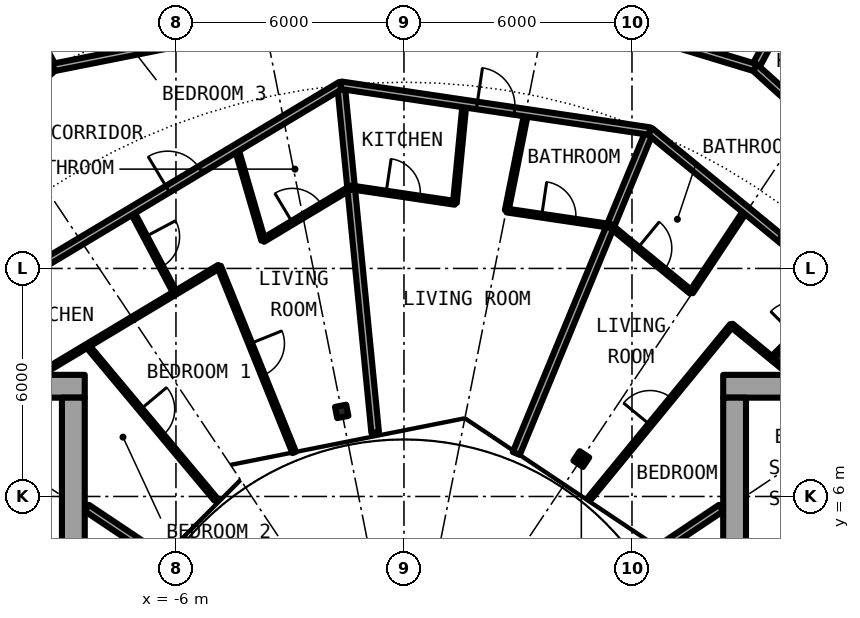
"""IFC4 building model, lengths in metres.
Left out: names, types, materials, properties, quantities, classifications, styles, units other than length and angle.
Written with IfcOpenShell. Run it as: python <this file> out.ifc"""

import sys

from ifc_helpers import new_model, si_unit, direction, frame, frame_2d, origin, origin_2d, place, context, subcontext, project, spatial, rectangle, i_section, extrude, element, fill, save


model = new_model("IFC4")
c1 = context("Model", 3, precision=1e-05, world=origin(), true_north=direction((0.0, 1.0)))
c2 = subcontext(c1, "Body", "Model", "MODEL_VIEW")
j1 = project(units=[si_unit("LENGTHUNIT", "METRE"), si_unit("PLANEANGLEUNIT", "RADIAN")], contexts=[c1])
p1 = place(None, origin())
s1 = spatial("IfcSite", under=j1, at=p1, CompositionType="ELEMENT")
p2 = place(p1, origin())
s2 = spatial("IfcBuilding", under=s1, at=p2, CompositionType="ELEMENT")
p3 = place(p2, frame((0.0, 0.0, 129.95)))
s3 = spatial("IfcBuildingStorey", under=s2, at=p3, CompositionType="ELEMENT", Elevation=129.95)
for number, where, z_axis, x_axis in (
    (1, (4.667, 6.984, 0.0), (0.0, 0.0, 1.0), (0.556, 0.831, 0.0)),
    (2, (-1.639, 8.239, 0.0), (0.0, 0.0, 1.0), (-0.195, 0.981, 0.0)),
):
    element("IfcColumn", number, at=place(p3, frame(where, z_axis=z_axis, x_axis=x_axis)), inside=s3, PredefinedType="COLUMN", context=c2, shape_type="SweptSolid", body=[
        extrude(i_section(OverallWidth=0.3, OverallDepth=0.3, WebThickness=0.011, FlangeThickness=0.019, FilletRadius=0.027, at=origin_2d()), origin(), (0.0, 0.0, 1.0), 3.05),
    ])
p4 = place(p3, frame((22.2, 8.9, 0.0), z_axis=(0.0, 0.0, 1.0), x_axis=(-1.0, 0.0, 0.0)))
e3 = element("IfcWall", 3, at=p4, inside=s3, PredefinedType="SHEAR", context=c2, shape_type="SweptSolid", body=[
    extrude(rectangle(XDim=13.8, YDim=0.6, at=frame_2d((6.9, 0.0))), origin(), (0.0, 0.0, 1.0), 3.05),
])
p5 = place(p4, frame((1.125, 0.0, 0.0)))
e4 = element("IfcOpeningElement", 4, at=p5, cuts=e3, PredefinedType="OPENING", context=c2, shape_type="SweptSolid", body=[
    extrude(rectangle(XDim=1.2, YDim=2.3, at=frame_2d((0.6, 1.15))), frame((0.0, 0.31, 0.0), z_axis=(0.0, -1.0, 0.0), x_axis=(1.0, 0.0, 0.0)), (0.0, 0.0, 1.0), 0.62),
])
p6 = place(p3, frame((8.7, -8.6, 0.0), z_axis=(0.0, 0.0, 1.0), x_axis=(0.0, 1.0, 0.0)))
e5 = element("IfcWall", 5, at=p6, inside=s3, PredefinedType="SHEAR", context=c2, shape_type="SweptSolid", body=[
    extrude(rectangle(XDim=17.2, YDim=0.6, at=frame_2d((8.6, 0.0))), origin(), (0.0, 0.0, 1.0), 3.05),
])
p7 = place(p6, frame((7.4, 0.0, 0.1)))
e6 = element("IfcOpeningElement", 6, at=p7, cuts=e5, PredefinedType="OPENING", context=c2, shape_type="SweptSolid", body=[
    extrude(rectangle(XDim=2.4, YDim=2.2, at=frame_2d((1.2, 1.1))), frame((0.0, 0.31, 0.0), z_axis=(0.0, -1.0, 0.0), x_axis=(1.0, 0.0, 0.0)), (0.0, 0.0, 1.0), 0.62),
])
p8 = place(p3, frame((-8.4, 8.9, 0.0), z_axis=(0.0, 0.0, 1.0), x_axis=(-1.0, 0.0, 0.0)))
e7 = element("IfcWall", 7, at=p8, inside=s3, PredefinedType="SHEAR", context=c2, shape_type="SweptSolid", body=[
    extrude(rectangle(XDim=13.8, YDim=0.6, at=frame_2d((6.9, 0.0))), origin(), (0.0, 0.0, 1.0), 3.05),
])
p9 = place(p8, frame((11.475, 0.0, 0.0)))
e8 = element("IfcOpeningElement", 8, at=p9, cuts=e7, PredefinedType="OPENING", context=c2, shape_type="SweptSolid", body=[
    extrude(rectangle(XDim=1.2, YDim=2.3, at=frame_2d((0.6, 1.15))), frame((0.0, 0.31, 0.0), z_axis=(0.0, -1.0, 0.0), x_axis=(1.0, 0.0, 0.0)), (0.0, 0.0, 1.0), 0.62),
])
p10 = place(p3, frame((-8.7, 8.6, 0.0), z_axis=(0.0, 0.0, 1.0), x_axis=(0.0, -1.0, 0.0)))
e9 = element("IfcWall", 9, at=p10, inside=s3, PredefinedType="SHEAR", context=c2, shape_type="SweptSolid", body=[
    extrude(rectangle(XDim=17.2, YDim=0.6, at=frame_2d((8.6, 0.0))), origin(), (0.0, 0.0, 1.0), 3.05),
])
p11 = place(p10, frame((7.4, 0.0, 0.1)))
e10 = element("IfcOpeningElement", 10, at=p11, cuts=e9, PredefinedType="OPENING", context=c2, shape_type="SweptSolid", body=[
    extrude(rectangle(XDim=2.4, YDim=2.2, at=frame_2d((1.2, 1.1))), frame((0.0, 0.31, 0.0), z_axis=(0.0, -1.0, 0.0), x_axis=(1.0, 0.0, 0.0)), (0.0, 0.0, 1.0), 0.62),
])
p12 = place(p3, frame((-12.815, 23.963, 0.0), z_axis=(0.0, 0.0, 1.0), x_axis=(0.471506520577, -0.881862574925, 0.0)))
e11 = element("IfcWall", 11, at=p12, inside=s3, PredefinedType="PARTITIONING", context=c2, shape_type="SweptSolid", body=[
    extrude(rectangle(XDim=7.574, YDim=0.2, at=frame_2d((3.787, 0.0))), origin(), (0.0, 0.0, 1.0), 2.7),
])
p13 = place(p3, frame((-8.335, 9.97, 0.0), z_axis=(0.0, 0.0, 1.0), x_axis=(0.641376424834, -0.767226356213, 0.0)))
e12 = element("IfcWall", 12, at=p13, inside=s3, PredefinedType="PARTITIONING", context=c2, shape_type="SweptSolid", body=[
    extrude(rectangle(XDim=5.275, YDim=0.1, at=frame_2d((2.637, 0.0))), origin(), (0.0, 0.0, 1.0), 2.7),
])
p14 = place(p13, frame((2.187, 0.0, 0.0)))
e13 = element("IfcOpeningElement", 13, at=p14, cuts=e12, PredefinedType="OPENING", context=c2, shape_type="SweptSolid", body=[
    extrude(rectangle(XDim=0.9, YDim=2.3, at=frame_2d((0.45, 1.15))), frame((0.0, 0.06, 0.0), z_axis=(0.0, -1.0, 0.0), x_axis=(1.0, 0.0, 0.0)), (0.0, 0.0, 1.0), 0.12),
])
p15 = place(p3, frame((-7.166, 13.517, 0.0), z_axis=(0.0, 0.0, 1.0), x_axis=(0.468337293896, -0.883549760425, 0.0)))
e14 = element("IfcWall", 14, at=p15, inside=s3, PredefinedType="PARTITIONING", context=c2, shape_type="SweptSolid", body=[
    extrude(rectangle(XDim=2.445, YDim=0.1, at=frame_2d((1.222, 0.0))), origin(), (0.0, 0.0, 1.0), 2.7),
])
p16 = place(p15, frame((0.772, 0.0, 0.0)))
e15 = element("IfcOpeningElement", 15, at=p16, cuts=e14, PredefinedType="OPENING", context=c2, shape_type="SweptSolid", body=[
    extrude(rectangle(XDim=0.9, YDim=2.3, at=frame_2d((0.45, 1.15))), frame((0.0, 0.06, 0.0), z_axis=(0.0, -1.0, 0.0), x_axis=(1.0, 0.0, 0.0)), (0.0, 0.0, 1.0), 0.12),
])
p17 = place(p3, frame((-4.864, 12.051, 0.0), z_axis=(0.0, 0.0, 1.0), x_axis=(0.374372761824, -0.927278294367, 0.0)))
e16 = element("IfcWall", 16, at=p17, inside=s3, PredefinedType="PARTITIONING", context=c2, shape_type="SweptSolid", body=[
    extrude(rectangle(XDim=5.276, YDim=0.1, at=frame_2d((2.638, 0.0))), origin(), (0.0, 0.0, 1.0), 2.7),
])
p18 = place(p17, frame((2.188, 0.0, 0.0)))
e17 = element("IfcOpeningElement", 17, at=p18, cuts=e16, PredefinedType="OPENING", context=c2, shape_type="SweptSolid", body=[
    extrude(rectangle(XDim=0.9, YDim=2.3, at=frame_2d((0.45, 1.15))), frame((0.0, 0.06, 0.0), z_axis=(0.0, -1.0, 0.0), x_axis=(1.0, 0.0, 0.0)), (0.0, 0.0, 1.0), 0.12),
])
p19 = place(p3, frame((-4.411, 15.168, 0.0), z_axis=(0.0, 0.0, 1.0), x_axis=(0.279201466266, -0.960232545395, 0.0)))
e18 = element("IfcWall", 18, at=p19, inside=s3, PredefinedType="PARTITIONING", context=c2, shape_type="SweptSolid", body=[
    extrude(rectangle(XDim=2.524, YDim=0.1, at=frame_2d((1.262, 0.0))), origin(), (0.0, 0.0, 1.0), 2.7),
])
p20 = place(p3, frame((-1.656, 16.819, 0.0), z_axis=(0.0, 0.0, 1.0), x_axis=(0.097815726767, -0.995204543597, 0.0)))
e19 = element("IfcWall", 19, at=p20, inside=s3, PredefinedType="PARTITIONING", context=c2, shape_type="SweptSolid", body=[
    extrude(rectangle(XDim=9.18, YDim=0.2, at=frame_2d((4.59, 0.0))), origin(), (0.0, 0.0, 1.0), 2.7),
])
p21 = place(p3, frame((1.339, 13.727, 0.0), z_axis=(0.0, 0.0, 1.0), x_axis=(0.096830025237, 0.995300932489, 0.0)))
e20 = element("IfcWall", 20, at=p21, inside=s3, PredefinedType="PARTITIONING", context=c2, shape_type="SweptSolid", body=[
    extrude(rectangle(XDim=2.622, YDim=0.1, at=frame_2d((1.311, 0.0))), origin(), (0.0, 0.0, 1.0), 2.7),
])
p22 = place(p3, frame((2.704, 13.524, 0.0), z_axis=(0.0, 0.0, 1.0), x_axis=(0.195937128464, 0.980616460034, 0.0)))
e21 = element("IfcWall", 21, at=p22, inside=s3, PredefinedType="PARTITIONING", context=c2, shape_type="SweptSolid", body=[
    extrude(rectangle(XDim=2.623, YDim=0.1, at=frame_2d((1.312, 0.0))), origin(), (0.0, 0.0, 1.0), 2.7),
])
p23 = place(p3, frame((2.955, 7.132, 0.0), z_axis=(0.0, 0.0, 1.0), x_axis=(0.382556139466, 0.923932248683, 0.0)))
e22 = element("IfcWall", 22, at=p23, inside=s3, PredefinedType="PARTITIONING", context=c2, shape_type="SweptSolid", body=[
    extrude(rectangle(XDim=9.18, YDim=0.2, at=frame_2d((4.59, 0.0))), origin(), (0.0, 0.0, 1.0), 2.7),
])
p24 = place(p3, frame((4.899, 5.967, 0.0), z_axis=(0.0, 0.0, 1.0), x_axis=(0.634358693064, 0.773038840249, 0.0)))
e23 = element("IfcWall", 23, at=p24, inside=s3, PredefinedType="PARTITIONING", context=c2, shape_type="SweptSolid", body=[
    extrude(rectangle(XDim=5.868, YDim=0.1, at=frame_2d((2.934, 0.0))), origin(), (0.0, 0.0, 1.0), 2.7),
])
p25 = place(p24, frame((2.484, 0.0, 0.0)))
e24 = element("IfcOpeningElement", 24, at=p25, cuts=e23, PredefinedType="OPENING", context=c2, shape_type="SweptSolid", body=[
    extrude(rectangle(XDim=0.9, YDim=2.3, at=frame_2d((0.45, 1.15))), frame((0.0, 0.06, 0.0), z_axis=(0.0, -1.0, 0.0), x_axis=(1.0, 0.0, 0.0)), (0.0, 0.0, 1.0), 0.12),
])
p26 = place(p3, frame((7.56, 11.375, 0.0), z_axis=(0.0, 0.0, 1.0), x_axis=(0.553354377247, 0.83294593653, 0.0)))
e25 = element("IfcWall", 25, at=p26, inside=s3, PredefinedType="PARTITIONING", context=c2, shape_type="SweptSolid", body=[
    extrude(rectangle(XDim=2.597, YDim=0.1, at=frame_2d((1.298, 0.0))), origin(), (0.0, 0.0, 1.0), 2.7),
])
p27 = place(p3, frame((9.239, 17.286, 0.0), z_axis=(0.0, 0.0, 1.0), x_axis=(0.471439510802, 0.881898399848, 0.0)))
e26 = element("IfcWall", 26, at=p27, inside=s3, PredefinedType="PARTITIONING", context=c2, shape_type="SweptSolid", body=[
    extrude(rectangle(XDim=7.575, YDim=0.2, at=frame_2d((3.787, 0.0))), origin(), (0.0, 0.0, 1.0), 2.7),
])
p28 = place(p3, frame((9.683, 9.632, 0.0), z_axis=(0.0, 0.0, 1.0), x_axis=(0.708796844581, 0.705412668665, 0.0)))
e27 = element("IfcWall", 27, at=p28, inside=s3, PredefinedType="PARTITIONING", context=c2, shape_type="SweptSolid", body=[
    extrude(rectangle(XDim=2.597, YDim=0.1, at=frame_2d((1.299, 0.0))), origin(), (0.0, 0.0, 1.0), 2.7),
])
p29 = place(p28, frame((0.849, 0.0, 0.0)))
e28 = element("IfcOpeningElement", 28, at=p29, cuts=e27, PredefinedType="OPENING", context=c2, shape_type="SweptSolid", body=[
    extrude(rectangle(XDim=0.9, YDim=2.3, at=frame_2d((0.45, 1.15))), frame((0.0, 0.06, 0.0), z_axis=(0.0, -1.0, 0.0), x_axis=(1.0, 0.0, 0.0)), (0.0, 0.0, 1.0), 0.12),
])
for number, where, z_axis, x_axis in (
    (29, (-6.513, 4.472, 0.0), (0.0, 0.0, 1.0), (-0.831, 0.556, 0.0)),
    (30, (6.513, 4.472, 0.0), (0.0, 0.0, 1.0), (0.831, 0.556, 0.0)),
):
    element("IfcWall", number, at=place(p3, frame(where, z_axis=z_axis, x_axis=x_axis)), inside=s3, PredefinedType="PARTITIONING", context=c2, shape_type="SweptSolid", body=[
        extrude(rectangle(XDim=2.203, YDim=0.2, at=frame_2d((1.101, 0.0))), origin(), (0.0, 0.0, 1.0), 2.7),
    ])
p30 = place(p3, frame((-9.623, 9.195, 0.0), z_axis=(0.0, 0.0, 1.0), x_axis=(0.857574416464, 0.514359913122, 0.0)))
e31 = element("IfcWall", 31, at=p30, inside=s3, PredefinedType="PARTITIONING", context=c2, shape_type="SweptSolid", body=[
    extrude(rectangle(XDim=5.551, YDim=0.1, at=frame_2d((2.775, 0.0))), origin(), (0.0, 0.0, 1.0), 2.7),
])
p31 = place(p3, frame((-3.706, 12.744, 0.0), z_axis=(0.0, 0.0, 1.0), x_axis=(0.857524856518, 0.514442533674, 0.0)))
e32 = element("IfcWall", 32, at=p31, inside=s3, PredefinedType="PARTITIONING", context=c2, shape_type="SweptSolid", body=[
    extrude(rectangle(XDim=2.698, YDim=0.1, at=frame_2d((1.349, 0.0))), origin(), (0.0, 0.0, 1.0), 2.7),
])
p32 = place(p31, frame((0.899, 0.0, 0.0)))
e33 = element("IfcOpeningElement", 33, at=p32, cuts=e32, PredefinedType="OPENING", context=c2, shape_type="SweptSolid", body=[
    extrude(rectangle(XDim=0.9, YDim=2.3, at=frame_2d((0.45, 1.15))), frame((0.0, 0.06, 0.0), z_axis=(0.0, -1.0, 0.0), x_axis=(1.0, 0.0, 0.0)), (0.0, 0.0, 1.0), 0.12),
])
p33 = place(p3, frame((5.431, 13.12, 0.0), z_axis=(0.0, 0.0, 1.0), x_axis=(0.773149312811, -0.634224045665, 0.0)))
e34 = element("IfcWall", 34, at=p33, inside=s3, PredefinedType="PARTITIONING", context=c2, shape_type="SweptSolid", body=[
    extrude(rectangle(XDim=2.749, YDim=0.1, at=frame_2d((1.374, 0.0))), origin(), (0.0, 0.0, 1.0), 2.7),
])
p34 = place(p33, frame((0.927, 0.0, 0.0)))
e35 = element("IfcOpeningElement", 35, at=p34, cuts=e34, PredefinedType="OPENING", context=c2, shape_type="SweptSolid", body=[
    extrude(rectangle(XDim=0.9, YDim=2.3, at=frame_2d((0.45, 1.15))), frame((0.0, 0.06, 0.0), z_axis=(0.0, -1.0, 0.0), x_axis=(1.0, 0.0, 0.0)), (0.0, 0.0, 1.0), 0.12),
])
p35 = place(p3, frame((8.618, 10.506, 0.0), z_axis=(0.0, 0.0, 1.0), x_axis=(0.772998703631, -0.634407600983, 0.0)))
e36 = element("IfcWall", 36, at=p35, inside=s3, PredefinedType="PARTITIONING", context=c2, shape_type="SweptSolid", body=[
    extrude(rectangle(XDim=2.056, YDim=0.1, at=frame_2d((1.028, 0.0))), origin(), (0.0, 0.0, 1.0), 2.7),
])
p36 = place(p3, frame((-1.392, 14.132, 0.0), z_axis=(0.0, 0.0, 1.0), x_axis=(0.989153611195, -0.146884762516, 0.0)))
e37 = element("IfcWall", 37, at=p36, inside=s3, PredefinedType="PARTITIONING", context=c2, shape_type="SweptSolid", body=[
    extrude(rectangle(XDim=2.764, YDim=0.1, at=frame_2d((1.382, 0.0))), origin(), (0.0, 0.0, 1.0), 2.7),
])
p37 = place(p36, frame((0.932, 0.0, 0.0)))
e38 = element("IfcOpeningElement", 38, at=p37, cuts=e37, PredefinedType="OPENING", context=c2, shape_type="SweptSolid", body=[
    extrude(rectangle(XDim=0.9, YDim=2.3, at=frame_2d((0.45, 1.15))), frame((0.0, 0.06, 0.0), z_axis=(0.0, -1.0, 0.0), x_axis=(1.0, 0.0, 0.0)), (0.0, 0.0, 1.0), 0.12),
])
p38 = place(p3, frame((2.707, 13.523, 0.0), z_axis=(0.0, 0.0, 1.0), x_axis=(0.98916494308, -0.146808430897, 0.0)))
e39 = element("IfcWall", 39, at=p38, inside=s3, PredefinedType="PARTITIONING", context=c2, shape_type="SweptSolid", body=[
    extrude(rectangle(XDim=2.759, YDim=0.1, at=frame_2d((1.379, 0.0))), origin(), (0.0, 0.0, 1.0), 2.7),
])
p39 = place(p38, frame((0.927, 0.0, 0.0)))
e40 = element("IfcOpeningElement", 40, at=p39, cuts=e39, PredefinedType="OPENING", context=c2, shape_type="SweptSolid", body=[
    extrude(rectangle(XDim=0.9, YDim=2.3, at=frame_2d((0.45, 1.15))), frame((0.0, 0.06, 0.0), z_axis=(0.0, -1.0, 0.0), x_axis=(1.0, 0.0, 0.0)), (0.0, 0.0, 1.0), 0.12),
])
p40 = place(p3, frame((-12.675, 10.215, 0.0), z_axis=(0.0, 0.0, 1.0), x_axis=(0.85772761283, 0.514104407867, 0.0)))
e41 = element("IfcWall", 41, at=p40, inside=s3, PredefinedType="PARTITIONING", context=c2, shape_type="SweptSolid", body=[
    extrude(rectangle(XDim=12.846, YDim=0.2, at=frame_2d((6.423, 0.0))), origin(), (0.0, 0.0, 1.0), 2.7),
])
p41 = place(p40, frame((7.529, 0.0, 0.0)))
e42 = element("IfcOpeningElement", 42, at=p41, cuts=e41, PredefinedType="OPENING", context=c2, shape_type="SweptSolid", body=[
    extrude(rectangle(XDim=1.0, YDim=2.3, at=frame_2d((0.5, 1.15))), frame((0.0, 0.11, 0.0), z_axis=(0.0, -1.0, 0.0), x_axis=(1.0, 0.0, 0.0)), (0.0, 0.0, 1.0), 0.22),
])
p42 = place(p3, frame((6.47, 15.613, 0.0), z_axis=(0.0, 0.0, 1.0), x_axis=(0.77292501819, -0.634497372931, 0.0)))
e43 = element("IfcWall", 43, at=p42, inside=s3, PredefinedType="PARTITIONING", context=c2, shape_type="SweptSolid", body=[
    extrude(rectangle(XDim=9.81, YDim=0.2, at=frame_2d((4.905, 0.0))), origin(), (0.0, 0.0, 1.0), 2.7),
])
p43 = place(p42, frame((4.404, 0.0, 0.0)))
e44 = element("IfcOpeningElement", 44, at=p43, cuts=e43, PredefinedType="OPENING", context=c2, shape_type="SweptSolid", body=[
    extrude(rectangle(XDim=1.0, YDim=2.3, at=frame_2d((0.5, 1.15))), frame((0.0, 0.11, 0.0), z_axis=(0.0, -1.0, 0.0), x_axis=(1.0, 0.0, 0.0)), (0.0, 0.0, 1.0), 0.22),
])
p44 = place(p3, frame((-1.656, 16.819, 0.0), z_axis=(0.0, 0.0, 1.0), x_axis=(0.989174071716, -0.146746910856, 0.0)))
e45 = element("IfcWall", 45, at=p44, inside=s3, PredefinedType="PARTITIONING", context=c2, shape_type="SweptSolid", body=[
    extrude(rectangle(XDim=8.212, YDim=0.2, at=frame_2d((4.106, 0.0))), origin(), (0.0, 0.0, 1.0), 2.7),
])
p45 = place(p44, frame((3.614, 0.0, 0.0)))
e46 = element("IfcOpeningElement", 46, at=p45, cuts=e45, PredefinedType="OPENING", context=c2, shape_type="SweptSolid", body=[
    extrude(rectangle(XDim=1.0, YDim=2.3, at=frame_2d((0.5, 1.15))), frame((0.0, 0.11, 0.0), z_axis=(0.0, -1.0, 0.0), x_axis=(1.0, 0.0, 0.0)), (0.0, 0.0, 1.0), 0.22),
])
p46 = place(p3, frame((-9.239, 17.286, 0.0), z_axis=(0.0, 0.0, 1.0), x_axis=(0.98077905287, 0.195121627328, 0.0)))
e47 = element("IfcWall", 47, at=p46, inside=s3, PredefinedType="PARTITIONING", context=c2, shape_type="SweptSolid", body=[
    extrude(rectangle(XDim=11.379, YDim=0.2, at=frame_2d((5.689, 0.0))), origin(), (0.0, 0.0, 1.0), 2.39),
])
p47 = place(p46, frame((6.138, 0.0, 0.0)))
e48 = element("IfcOpeningElement", 48, at=p47, cuts=e47, PredefinedType="OPENING", context=c2, shape_type="SweptSolid", body=[
    extrude(rectangle(XDim=1.0, YDim=2.3, at=frame_2d((0.5, 1.15))), frame((0.0, 0.11, 0.0), z_axis=(0.0, -1.0, 0.0), x_axis=(1.0, 0.0, 0.0)), (0.0, 0.0, 1.0), 0.22),
])
p48 = place(p3, frame((-12.056, 14.731, 0.0), z_axis=(0.0, 0.0, 1.0), x_axis=(0.74113339149, 0.671357800296, 0.0)))
e49 = element("IfcWall", 49, at=p48, inside=s3, PredefinedType="PARTITIONING", context=c2, shape_type="SweptSolid", body=[
    extrude(rectangle(XDim=3.81, YDim=0.2, at=frame_2d((1.905, 0.0))), origin(), (0.0, 0.0, 1.0), 2.7),
])
p49 = place(p3, frame((9.232, 17.289, 0.0), z_axis=(0.0, 0.0, 1.0), x_axis=(0.741112328493, -0.67138105168, 0.0)))
e50 = element("IfcWall", 50, at=p49, inside=s3, PredefinedType="PARTITIONING", context=c2, shape_type="SweptSolid", body=[
    extrude(rectangle(XDim=5.752, YDim=0.2, at=frame_2d((2.876, 0.0))), origin(), (0.0, 0.0, 1.0), 2.7),
])
p50 = place(p49, frame((4.27, 0.0, 0.0)))
e51 = element("IfcOpeningElement", 51, at=p50, cuts=e50, PredefinedType="OPENING", context=c2, shape_type="SweptSolid", body=[
    extrude(rectangle(XDim=1.0, YDim=2.3, at=frame_2d((0.5, 1.15))), frame((0.0, 0.11, 0.0), z_axis=(0.0, -1.0, 0.0), x_axis=(1.0, 0.0, 0.0)), (0.0, 0.0, 1.0), 0.22),
])
p51 = place(p3, frame((1.921, 19.506, 0.0), z_axis=(0.0, 0.0, 1.0), x_axis=(0.956929842753, -0.290319265721, 0.0)))
e52 = element("IfcWall", 52, at=p51, inside=s3, PredefinedType="PARTITIONING", context=c2, shape_type="SweptSolid", body=[
    extrude(rectangle(XDim=7.647, YDim=0.2, at=frame_2d((3.824, 0.0))), origin(), (0.0, 0.0, 1.0), 2.39),
])
p52 = place(p51, frame((4.28, 0.0, 0.0)))
e53 = element("IfcOpeningElement", 53, at=p52, cuts=e52, PredefinedType="OPENING", context=c2, shape_type="SweptSolid", body=[
    extrude(rectangle(XDim=1.0, YDim=2.3, at=frame_2d((0.5, 1.15))), frame((0.0, 0.11, 0.0), z_axis=(0.0, -1.0, 0.0), x_axis=(1.0, 0.0, 0.0)), (0.0, 0.0, 1.0), 0.22),
])
p53 = place(p43, origin())
e54 = element("IfcDoor", 54, at=p53, inside=s3, OperationType="SINGLE_SWING_LEFT", PredefinedType="DOOR", context=c2, shape_type="SweptSolid", body=[
    extrude(rectangle(XDim=1.0, YDim=2.3, at=frame_2d((0.5, 1.15))), frame((0.0, 0.025, 0.0), z_axis=(0.0, -1.0, 0.0), x_axis=(1.0, 0.0, 0.0)), (0.0, 0.0, 1.0), 0.05),
])
fill(e44, e54)
p54 = place(p34, origin())
e55 = element("IfcDoor", 55, at=p54, inside=s3, OperationType="SINGLE_SWING_RIGHT", PredefinedType="DOOR", context=c2, shape_type="SweptSolid", body=[
    extrude(rectangle(XDim=0.9, YDim=2.3, at=frame_2d((0.45, 1.15))), frame((0.0, 0.025, 0.0), z_axis=(0.0, -1.0, 0.0), x_axis=(1.0, 0.0, 0.0)), (0.0, 0.0, 1.0), 0.05),
])
fill(e35, e55)
p55 = place(p25, origin())
e56 = element("IfcDoor", 56, at=p55, inside=s3, OperationType="SINGLE_SWING_RIGHT", PredefinedType="DOOR", context=c2, shape_type="SweptSolid", body=[
    extrude(rectangle(XDim=0.9, YDim=2.3, at=frame_2d((0.45, 1.15))), frame((0.0, 0.025, 0.0), z_axis=(0.0, -1.0, 0.0), x_axis=(1.0, 0.0, 0.0)), (0.0, 0.0, 1.0), 0.05),
])
fill(e24, e56)
p56 = place(p45, origin())
e57 = element("IfcDoor", 57, at=p56, inside=s3, OperationType="SINGLE_SWING_RIGHT", PredefinedType="DOOR", context=c2, shape_type="SweptSolid", body=[
    extrude(rectangle(XDim=1.0, YDim=2.3, at=frame_2d((0.5, 1.15))), frame((0.0, 0.025, 0.0), z_axis=(0.0, -1.0, 0.0), x_axis=(1.0, 0.0, 0.0)), (0.0, 0.0, 1.0), 0.05),
])
fill(e46, e57)
p57 = place(p39, origin())
e58 = element("IfcDoor", 58, at=p57, inside=s3, OperationType="SINGLE_SWING_LEFT", PredefinedType="DOOR", context=c2, shape_type="SweptSolid", body=[
    extrude(rectangle(XDim=0.9, YDim=2.3, at=frame_2d((0.45, 1.15))), frame((0.0, 0.025, 0.0), z_axis=(0.0, -1.0, 0.0), x_axis=(1.0, 0.0, 0.0)), (0.0, 0.0, 1.0), 0.05),
])
fill(e40, e58)
p58 = place(p37, origin())
e59 = element("IfcDoor", 59, at=p58, inside=s3, OperationType="SINGLE_SWING_RIGHT", PredefinedType="DOOR", context=c2, shape_type="SweptSolid", body=[
    extrude(rectangle(XDim=0.9, YDim=2.3, at=frame_2d((0.45, 1.15))), frame((0.0, 0.025, 0.0), z_axis=(0.0, -1.0, 0.0), x_axis=(1.0, 0.0, 0.0)), (0.0, 0.0, 1.0), 0.05),
])
fill(e38, e59)
p59 = place(p41, origin())
e60 = element("IfcDoor", 60, at=p59, inside=s3, OperationType="SINGLE_SWING_RIGHT", PredefinedType="DOOR", context=c2, shape_type="SweptSolid", body=[
    extrude(rectangle(XDim=1.0, YDim=2.3, at=frame_2d((0.5, 1.15))), frame((0.0, 0.025, 0.0), z_axis=(0.0, -1.0, 0.0), x_axis=(1.0, 0.0, 0.0)), (0.0, 0.0, 1.0), 0.05),
])
fill(e42, e60)
p60 = place(p32, origin())
e61 = element("IfcDoor", 61, at=p60, inside=s3, OperationType="SINGLE_SWING_RIGHT", PredefinedType="DOOR", context=c2, shape_type="SweptSolid", body=[
    extrude(rectangle(XDim=0.9, YDim=2.3, at=frame_2d((0.45, 1.15))), frame((0.0, 0.025, 0.0), z_axis=(0.0, -1.0, 0.0), x_axis=(1.0, 0.0, 0.0)), (0.0, 0.0, 1.0), 0.05),
])
fill(e33, e61)
p61 = place(p16, origin())
e62 = element("IfcDoor", 62, at=p61, inside=s3, OperationType="SINGLE_SWING_LEFT", PredefinedType="DOOR", context=c2, shape_type="SweptSolid", body=[
    extrude(rectangle(XDim=0.9, YDim=2.3, at=frame_2d((0.45, 1.15))), frame((0.0, 0.025, 0.0), z_axis=(0.0, -1.0, 0.0), x_axis=(1.0, 0.0, 0.0)), (0.0, 0.0, 1.0), 0.05),
])
fill(e15, e62)
p62 = place(p18, origin())
e63 = element("IfcDoor", 63, at=p62, inside=s3, OperationType="SINGLE_SWING_RIGHT", PredefinedType="DOOR", context=c2, shape_type="SweptSolid", body=[
    extrude(rectangle(XDim=0.9, YDim=2.3, at=frame_2d((0.45, 1.15))), frame((0.0, 0.025, 0.0), z_axis=(0.0, -1.0, 0.0), x_axis=(1.0, 0.0, 0.0)), (0.0, 0.0, 1.0), 0.05),
])
fill(e17, e63)
p63 = place(p14, origin())
e64 = element("IfcDoor", 64, at=p63, inside=s3, OperationType="SINGLE_SWING_RIGHT", PredefinedType="DOOR", context=c2, shape_type="SweptSolid", body=[
    extrude(rectangle(XDim=0.9, YDim=2.3, at=frame_2d((0.45, 1.15))), frame((0.0, 0.025, 0.0), z_axis=(0.0, -1.0, 0.0), x_axis=(1.0, 0.0, 0.0)), (0.0, 0.0, 1.0), 0.05),
])
fill(e13, e64)
save(model, sys.argv[1])
